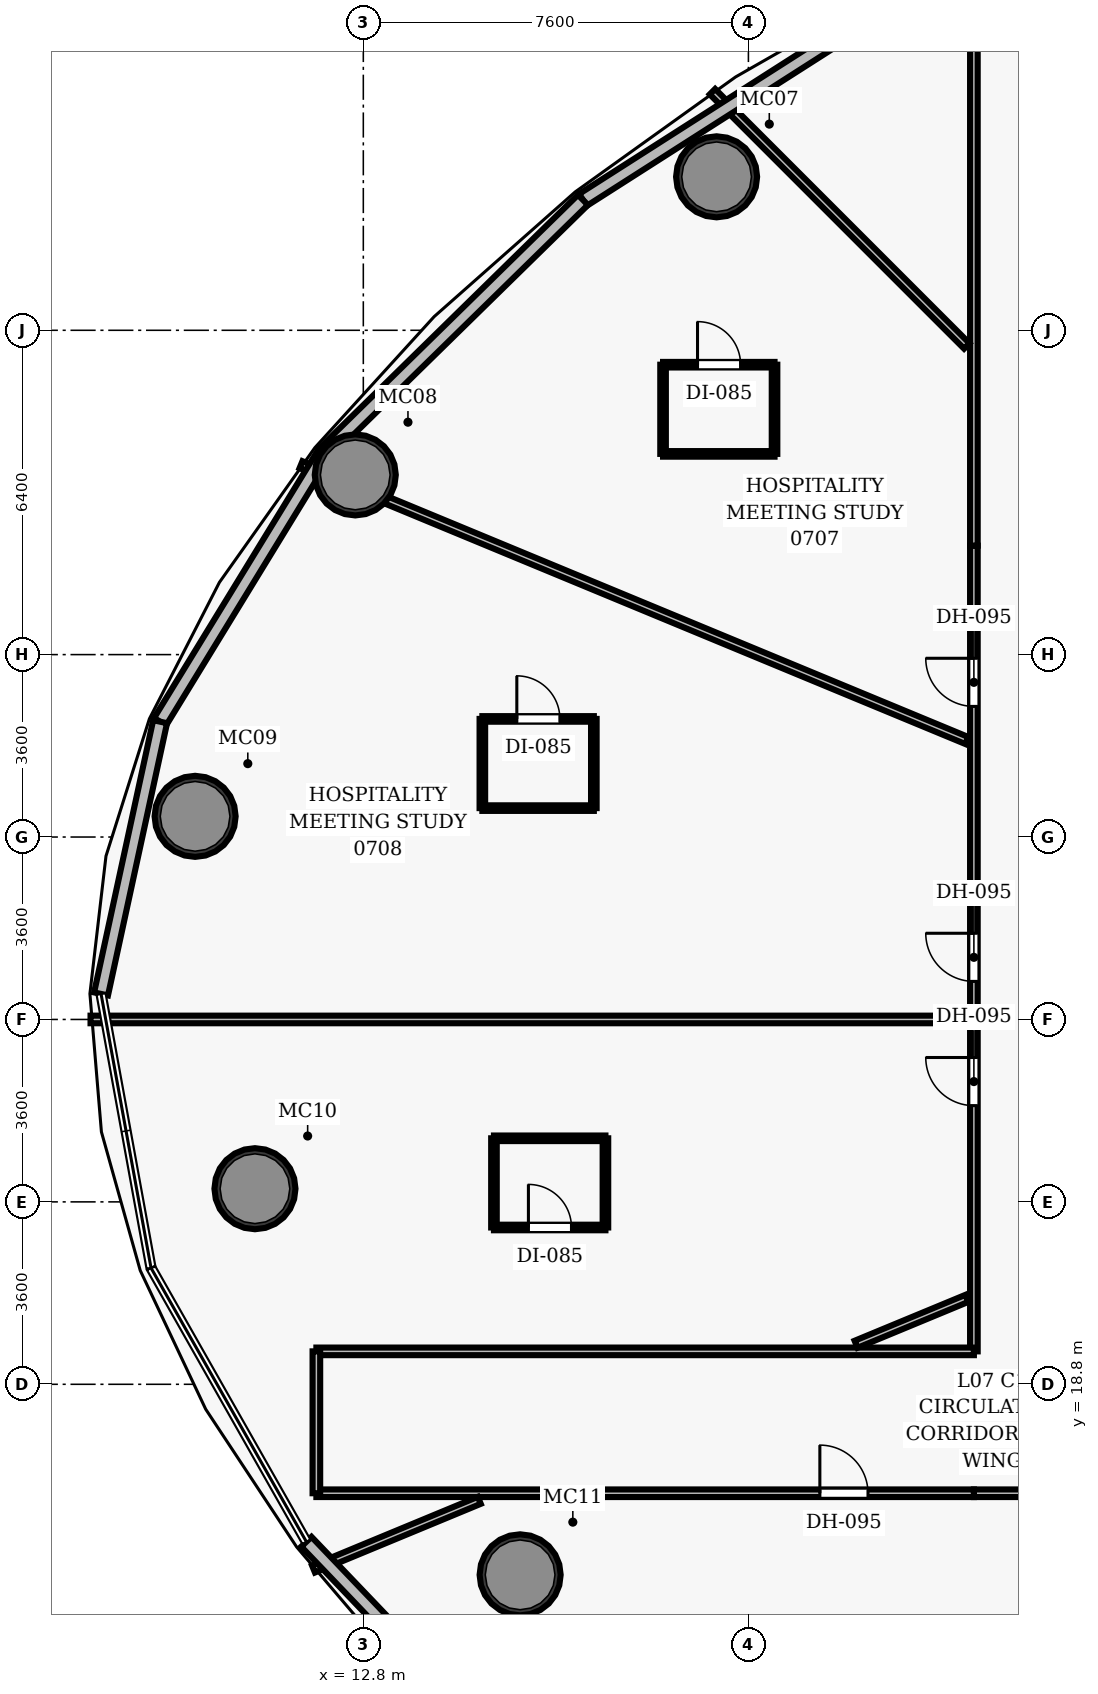
"""IFC4 building model, lengths in metres.
Left out: names, types, materials, properties, quantities, classifications, styles, units other than length and angle.
Written with IfcOpenShell. Run it as: python <this file> out.ifc"""

import sys

from ifc_helpers import new_model, si_unit, direction, frame, frame_2d, origin, origin_2d, place, context, subcontext, project, spatial, rectangle, hollow_circle, extrude, element, fill, save


model = new_model("IFC4")
c1 = context("Model", 3, precision=1e-05, world=origin(), true_north=direction((0.0, 1.0)))
c2 = subcontext(c1, "Body", "Model", "MODEL_VIEW")
j1 = project(units=[si_unit("LENGTHUNIT", "METRE"), si_unit("PLANEANGLEUNIT", "RADIAN")], contexts=[c1])
p1 = place(None, origin())
s1 = spatial("IfcSite", under=j1, at=p1, CompositionType="ELEMENT")
p2 = place(p1, origin())
s2 = spatial("IfcBuilding", under=s1, at=p2, CompositionType="ELEMENT")
p3 = place(p2, frame((0.0, 0.0, 41.4)))
s3 = spatial("IfcBuildingStorey", under=s2, at=p3, CompositionType="ELEMENT", Elevation=41.4)
for number, where, z_axis, x_axis in (
    (1, (19.772, 42.629, 0.0), (0.0, 0.0, 1.0), (1.0, 0.0, 0.0)),
    (2, (12.641, 36.746, 0.0), (0.0, 0.0, 1.0), (1.0, 0.0, 0.0)),
    (3, (9.48, 30.008, 0.0), (0.0, 0.0, 1.0), (1.0, 0.0, 0.0)),
    (4, (10.661, 22.66, 0.0), (0.0, 0.0, 1.0), (1.0, 0.0, 0.0)),
    (5, (15.895, 15.04, 0.0), (0.0, 0.0, 1.0), (1.0, 0.0, 0.0)),
):
    element("IfcColumn", number, at=place(p3, frame(where, z_axis=z_axis, x_axis=x_axis)), inside=s3, PredefinedType="COLUMN", context=c2, shape_type="SweptSolid", body=[
        extrude(hollow_circle(Radius=0.8, WallThickness=0.06, at=origin_2d()), origin(), (0.0, 0.0, 1.0), 3.5),
    ])
p4 = place(p3, frame((24.85, 16.65, 0.0), z_axis=(0.0, 0.0, 1.0), x_axis=(1.0, 0.0, 0.0)))
e6 = element("IfcWall", 6, at=p4, inside=s3, PredefinedType="PARTITIONING", context=c2, shape_type="SweptSolid", body=[
    extrude(rectangle(XDim=23.5, YDim=0.15, at=frame_2d((11.75, 0.0))), origin(), (0.0, 0.0, 1.0), 2.6),
])
p5 = place(p4, frame((7.505, 0.0, 0.0)))
e7 = element("IfcOpeningElement", 7, at=p5, cuts=e6, PredefinedType="OPENING", context=c2, shape_type="SweptSolid", body=[
    extrude(rectangle(XDim=0.95, YDim=2.15, at=frame_2d((0.475, 1.075))), frame((0.0, 0.085, 0.0), z_axis=(0.0, -1.0, 0.0), x_axis=(1.0, 0.0, 0.0)), (0.0, 0.0, 1.0), 0.17),
])
p6 = place(p4, frame((11.391, 0.0, 0.0)))
e8 = element("IfcOpeningElement", 8, at=p6, cuts=e6, PredefinedType="OPENING", context=c2, shape_type="SweptSolid", body=[
    extrude(rectangle(XDim=0.95, YDim=2.15, at=frame_2d((0.475, 1.075))), frame((0.0, 0.085, 0.0), z_axis=(0.0, -1.0, 0.0), x_axis=(1.0, 0.0, 0.0)), (0.0, 0.0, 1.0), 0.17),
])
p7 = place(p4, frame((14.636, 0.0, 0.0)))
e9 = element("IfcOpeningElement", 9, at=p7, cuts=e6, PredefinedType="OPENING", context=c2, shape_type="SweptSolid", body=[
    extrude(rectangle(XDim=0.95, YDim=2.15, at=frame_2d((0.475, 1.075))), frame((0.0, 0.085, 0.0), z_axis=(0.0, -1.0, 0.0), x_axis=(1.0, 0.0, 0.0)), (0.0, 0.0, 1.0), 0.17),
])
p8 = place(p4, frame((17.845, 0.0, 0.0)))
e10 = element("IfcOpeningElement", 10, at=p8, cuts=e6, PredefinedType="OPENING", context=c2, shape_type="SweptSolid", body=[
    extrude(rectangle(XDim=0.95, YDim=2.15, at=frame_2d((0.475, 1.075))), frame((0.0, 0.085, 0.0), z_axis=(0.0, -1.0, 0.0), x_axis=(1.0, 0.0, 0.0)), (0.0, 0.0, 1.0), 0.17),
])
p9 = place(p3, frame((24.85, 19.45, 0.0), z_axis=(0.0, 0.0, 1.0), x_axis=(0.0, 1.0, 0.0)))
e11 = element("IfcWall", 11, at=p9, inside=s3, PredefinedType="PARTITIONING", context=c2, shape_type="SweptSolid", body=[
    extrude(rectangle(XDim=15.9, YDim=0.15, at=frame_2d((7.95, 0.0))), origin(), (0.0, 0.0, 1.0), 2.6),
])
p10 = place(p9, frame((12.728, 0.0, 0.0)))
e12 = element("IfcOpeningElement", 12, at=p10, cuts=e11, PredefinedType="OPENING", context=c2, shape_type="SweptSolid", body=[
    extrude(rectangle(XDim=0.95, YDim=2.15, at=frame_2d((0.475, 1.075))), frame((0.0, 0.085, 0.0), z_axis=(0.0, -1.0, 0.0), x_axis=(1.0, 0.0, 0.0)), (0.0, 0.0, 1.0), 0.17),
])
p11 = place(p9, frame((7.301, 0.0, 0.0)))
e13 = element("IfcOpeningElement", 13, at=p11, cuts=e11, PredefinedType="OPENING", context=c2, shape_type="SweptSolid", body=[
    extrude(rectangle(XDim=0.95, YDim=2.15, at=frame_2d((0.475, 1.075))), frame((0.0, 0.085, 0.0), z_axis=(0.0, -1.0, 0.0), x_axis=(1.0, 0.0, 0.0)), (0.0, 0.0, 1.0), 0.17),
])
p12 = place(p9, frame((4.849, 0.0, 0.0)))
e14 = element("IfcOpeningElement", 14, at=p12, cuts=e11, PredefinedType="OPENING", context=c2, shape_type="SweptSolid", body=[
    extrude(rectangle(XDim=0.95, YDim=2.15, at=frame_2d((0.475, 1.075))), frame((0.0, 0.085, 0.0), z_axis=(0.0, -1.0, 0.0), x_axis=(1.0, 0.0, 0.0)), (0.0, 0.0, 1.0), 0.17),
])
p13 = place(p3, frame((11.874, 19.45, 0.0), z_axis=(0.0, 0.0, 1.0), x_axis=(1.0, 0.0, 0.0)))
e15 = element("IfcWall", 15, at=p13, inside=s3, PredefinedType="PARTITIONING", context=c2, shape_type="SweptSolid", body=[
    extrude(rectangle(XDim=12.977, YDim=0.15, at=frame_2d((6.488, 0.0))), origin(), (0.0, 0.0, 1.0), 2.6),
])
p14 = place(p3, frame((11.874, 16.65, 0.0), z_axis=(0.0, 0.0, 1.0), x_axis=(1.0, 0.0, 0.0)))
e16 = element("IfcWall", 16, at=p14, inside=s3, PredefinedType="PARTITIONING", context=c2, shape_type="SweptSolid", body=[
    extrude(rectangle(XDim=12.977, YDim=0.15, at=frame_2d((6.488, 0.0))), origin(), (0.0, 0.0, 1.0), 2.6),
])
p15 = place(p14, frame((9.937, 0.0, 0.0)))
e17 = element("IfcOpeningElement", 17, at=p15, cuts=e16, PredefinedType="OPENING", context=c2, shape_type="SweptSolid", body=[
    extrude(rectangle(XDim=0.95, YDim=2.15, at=frame_2d((0.475, 1.075))), frame((0.0, 0.085, 0.0), z_axis=(0.0, -1.0, 0.0), x_axis=(1.0, 0.0, 0.0)), (0.0, 0.0, 1.0), 0.17),
])
p16 = place(p3, frame((11.874, 16.65, 0.0), z_axis=(0.0, 0.0, 1.0), x_axis=(0.0, 1.0, 0.0)))
e18 = element("IfcWall", 18, at=p16, inside=s3, PredefinedType="PARTITIONING", context=c2, shape_type="SweptSolid", body=[
    extrude(rectangle(XDim=2.8, YDim=0.15, at=frame_2d((1.4, 0.0))), origin(), (0.0, 0.0, 1.0), 2.6),
])
p17 = place(p3, frame((24.85, 35.35, 0.0), z_axis=(0.0, 0.0, 1.0), x_axis=(0.0, 1.0, 0.0)))
e19 = element("IfcWall", 19, at=p17, inside=s3, PredefinedType="PARTITIONING", context=c2, shape_type="SweptSolid", body=[
    extrude(rectangle(XDim=10.15, YDim=0.15, at=frame_2d((5.075, 0.0))), origin(), (0.0, 0.0, 1.0), 2.6),
])
p18 = place(p3, frame((24.71, 39.29, 0.0), z_axis=(0.0, 0.0, 1.0), x_axis=(-0.707106781187, 0.707106781187, 0.0)))
e20 = element("IfcWall", 20, at=p18, inside=s3, PredefinedType="PARTITIONING", context=c2, shape_type="SweptSolid", body=[
    extrude(rectangle(XDim=7.099, YDim=0.15, at=frame_2d((3.549, 0.0))), origin(), (0.0, 0.0, 1.0), 2.6),
])
p19 = place(p3, frame((24.71, 31.505, 0.0), z_axis=(0.0, 0.0, 1.0), x_axis=(-0.923878333013, 0.382686328197, 0.0)))
e21 = element("IfcWall", 21, at=p19, inside=s3, PredefinedType="PARTITIONING", context=c2, shape_type="SweptSolid", body=[
    extrude(rectangle(XDim=14.223, YDim=0.15, at=frame_2d((7.111, 0.0))), origin(), (0.0, 0.0, 1.0), 2.6),
])
p20 = place(p3, frame((24.71, 26.0, 0.0), z_axis=(0.0, 0.0, 1.0), x_axis=(-1.0, 0.0, 0.0)))
e22 = element("IfcWall", 22, at=p20, inside=s3, PredefinedType="PARTITIONING", context=c2, shape_type="SweptSolid", body=[
    extrude(rectangle(XDim=17.293, YDim=0.15, at=frame_2d((8.647, 0.0))), origin(), (0.0, 0.0, 1.0), 2.6),
])
p21 = place(p3, frame((24.71, 20.495, 0.0), z_axis=(0.0, 0.0, 1.0), x_axis=(-0.923887247067, -0.382664807249, 0.0)))
e23 = element("IfcWall", 23, at=p21, inside=s3, PredefinedType="PARTITIONING", context=c2, shape_type="SweptSolid", body=[
    extrude(rectangle(XDim=2.365, YDim=0.15, at=frame_2d((1.183, 0.0))), origin(), (0.0, 0.0, 1.0), 2.6),
])
p22 = place(p3, frame((15.089, 16.51, 0.0), z_axis=(0.0, 0.0, 1.0), x_axis=(-0.923882422403, -0.382676455475, 0.0)))
e24 = element("IfcWall", 24, at=p22, inside=s3, PredefinedType="PARTITIONING", context=c2, shape_type="SweptSolid", body=[
    extrude(rectangle(XDim=3.542, YDim=0.15, at=frame_2d((1.771, 0.0))), origin(), (0.0, 0.0, 1.0), 2.6),
])
p23 = place(p3, frame((28.51, 16.51, 0.0), z_axis=(0.0, 0.0, 1.0), x_axis=(-0.707106781187, -0.707106781187, 0.0)))
e25 = element("IfcWall", 25, at=p23, inside=s3, PredefinedType="PARTITIONING", context=c2, shape_type="SweptSolid", body=[
    extrude(rectangle(XDim=12.312, YDim=0.15, at=frame_2d((6.156, 0.0))), origin(), (0.0, 0.0, 1.0), 2.6),
])
p24 = place(p3, frame((18.716, 37.161, 0.0), z_axis=(0.0, 0.0, 1.0), x_axis=(1.0, 0.0, 0.0)))
e26 = element("IfcWall", 26, at=p24, inside=s3, PredefinedType="PARTITIONING", context=c2, shape_type="SweptSolid", body=[
    extrude(rectangle(XDim=2.2, YDim=0.11, at=frame_2d((1.1, 0.0))), origin(), (0.0, 0.0, 1.0), 2.6),
])
p25 = place(p3, frame((18.716, 38.921, 0.0), z_axis=(0.0, 0.0, 1.0), x_axis=(1.0, 0.0, 0.0)))
e27 = element("IfcWall", 27, at=p25, inside=s3, PredefinedType="PARTITIONING", context=c2, shape_type="SweptSolid", body=[
    extrude(rectangle(XDim=2.2, YDim=0.11, at=frame_2d((1.1, 0.0))), origin(), (0.0, 0.0, 1.0), 2.6),
])
p26 = place(p25, frame((0.68, 0.0, 0.0)))
e28 = element("IfcOpeningElement", 28, at=p26, cuts=e27, PredefinedType="OPENING", context=c2, shape_type="SweptSolid", body=[
    extrude(rectangle(XDim=0.85, YDim=2.1, at=frame_2d((0.425, 1.05))), frame((0.0, 0.065, 0.0), z_axis=(0.0, -1.0, 0.0), x_axis=(1.0, 0.0, 0.0)), (0.0, 0.0, 1.0), 0.13),
])
for number, where, z_axis, x_axis in (
    (29, (18.716, 37.161, 0.0), (0.0, 0.0, 1.0), (0.0, 1.0, 0.0)),
    (30, (20.916, 37.161, 0.0), (0.0, 0.0, 1.0), (0.0, 1.0, 0.0)),
):
    element("IfcWall", number, at=place(p3, frame(where, z_axis=z_axis, x_axis=x_axis)), inside=s3, PredefinedType="PARTITIONING", context=c2, shape_type="SweptSolid", body=[
        extrude(rectangle(XDim=1.76, YDim=0.11, at=frame_2d((0.88, 0.0))), origin(), (0.0, 0.0, 1.0), 2.6),
    ])
p27 = place(p3, frame((15.149, 30.171, 0.0), z_axis=(0.0, 0.0, 1.0), x_axis=(1.0, 0.0, 0.0)))
e31 = element("IfcWall", 31, at=p27, inside=s3, PredefinedType="PARTITIONING", context=c2, shape_type="SweptSolid", body=[
    extrude(rectangle(XDim=2.2, YDim=0.11, at=frame_2d((1.1, 0.0))), origin(), (0.0, 0.0, 1.0), 2.6),
])
p28 = place(p3, frame((15.149, 31.931, 0.0), z_axis=(0.0, 0.0, 1.0), x_axis=(1.0, 0.0, 0.0)))
e32 = element("IfcWall", 32, at=p28, inside=s3, PredefinedType="PARTITIONING", context=c2, shape_type="SweptSolid", body=[
    extrude(rectangle(XDim=2.2, YDim=0.11, at=frame_2d((1.1, 0.0))), origin(), (0.0, 0.0, 1.0), 2.6),
])
p29 = place(p28, frame((0.68, 0.0, 0.0)))
e33 = element("IfcOpeningElement", 33, at=p29, cuts=e32, PredefinedType="OPENING", context=c2, shape_type="SweptSolid", body=[
    extrude(rectangle(XDim=0.85, YDim=2.1, at=frame_2d((0.425, 1.05))), frame((0.0, 0.065, 0.0), z_axis=(0.0, -1.0, 0.0), x_axis=(1.0, 0.0, 0.0)), (0.0, 0.0, 1.0), 0.13),
])
for number, where, z_axis, x_axis in (
    (34, (15.149, 30.171, 0.0), (0.0, 0.0, 1.0), (0.0, 1.0, 0.0)),
    (35, (17.35, 30.171, 0.0), (0.0, 0.0, 1.0), (0.0, 1.0, 0.0)),
):
    element("IfcWall", number, at=place(p3, frame(where, z_axis=z_axis, x_axis=x_axis)), inside=s3, PredefinedType="PARTITIONING", context=c2, shape_type="SweptSolid", body=[
        extrude(rectangle(XDim=1.76, YDim=0.11, at=frame_2d((0.88, 0.0))), origin(), (0.0, 0.0, 1.0), 2.6),
    ])
p30 = place(p3, frame((15.378, 21.895, 0.0), z_axis=(0.0, 0.0, 1.0), x_axis=(1.0, 0.0, 0.0)))
e36 = element("IfcWall", 36, at=p30, inside=s3, PredefinedType="PARTITIONING", context=c2, shape_type="SweptSolid", body=[
    extrude(rectangle(XDim=2.2, YDim=0.11, at=frame_2d((1.1, 0.0))), origin(), (0.0, 0.0, 1.0), 2.6),
])
p31 = place(p30, frame((0.68, 0.0, 0.0)))
e37 = element("IfcOpeningElement", 37, at=p31, cuts=e36, PredefinedType="OPENING", context=c2, shape_type="SweptSolid", body=[
    extrude(rectangle(XDim=0.85, YDim=2.1, at=frame_2d((0.425, 1.05))), frame((0.0, 0.065, 0.0), z_axis=(0.0, -1.0, 0.0), x_axis=(1.0, 0.0, 0.0)), (0.0, 0.0, 1.0), 0.13),
])
p32 = place(p3, frame((15.378, 23.655, 0.0), z_axis=(0.0, 0.0, 1.0), x_axis=(1.0, 0.0, 0.0)))
e38 = element("IfcWall", 38, at=p32, inside=s3, PredefinedType="PARTITIONING", context=c2, shape_type="SweptSolid", body=[
    extrude(rectangle(XDim=2.2, YDim=0.11, at=frame_2d((1.1, 0.0))), origin(), (0.0, 0.0, 1.0), 2.6),
])
for number, where, z_axis, x_axis in (
    (39, (15.378, 21.895, 0.0), (0.0, 0.0, 1.0), (0.0, 1.0, 0.0)),
    (40, (17.578, 21.895, 0.0), (0.0, 0.0, 1.0), (0.0, 1.0, 0.0)),
):
    element("IfcWall", number, at=place(p3, frame(where, z_axis=z_axis, x_axis=x_axis)), inside=s3, PredefinedType="PARTITIONING", context=c2, shape_type="SweptSolid", body=[
        extrude(rectangle(XDim=1.76, YDim=0.11, at=frame_2d((0.88, 0.0))), origin(), (0.0, 0.0, 1.0), 2.6),
    ])
p33 = place(p3, frame((17.135, 42.173, 0.0), z_axis=(0.0, 0.0, 1.0), x_axis=(0.84275430181, 0.538298417962, 0.0)))
e41 = element("IfcWall", 41, at=p33, inside=s3, PredefinedType="SOLIDWALL", context=c2, shape_type="SweptSolid", body=[
    extrude(rectangle(XDim=7.845, YDim=0.28, at=frame_2d((3.922, 0.0))), origin(), (0.0, 0.0, 1.0), 3.25),
])
p34 = place(p3, frame((12.033, 37.175, 0.0), z_axis=(0.0, 0.0, 1.0), x_axis=(0.714316037153, 0.699823262736, 0.0)))
e42 = element("IfcWall", 42, at=p34, inside=s3, PredefinedType="SOLIDWALL", context=c2, shape_type="SweptSolid", body=[
    extrude(rectangle(XDim=7.143, YDim=0.28, at=frame_2d((3.571, 0.0))), origin(), (0.0, 0.0, 1.0), 3.25),
])
p35 = place(p3, frame((8.79, 31.876, 0.0), z_axis=(0.0, 0.0, 1.0), x_axis=(0.522069850624, 0.852902732479, 0.0)))
e43 = element("IfcWall", 43, at=p35, inside=s3, PredefinedType="SOLIDWALL", context=c2, shape_type="SweptSolid", body=[
    extrude(rectangle(XDim=6.212, YDim=0.28, at=frame_2d((3.106, 0.0))), origin(), (0.0, 0.0, 1.0), 3.25),
])
p36 = place(p3, frame((7.624, 26.504, 0.0), z_axis=(0.0, 0.0, 1.0), x_axis=(0.211966847204, 0.977276857235, 0.0)))
e44 = element("IfcWall", 44, at=p36, inside=s3, PredefinedType="SOLIDWALL", context=c2, shape_type="SweptSolid", body=[
    extrude(rectangle(XDim=5.498, YDim=0.28, at=frame_2d((2.749, 0.0))), origin(), (0.0, 0.0, 1.0), 3.25),
])
p37 = place(p3, frame((16.61, 10.528, 0.0), z_axis=(0.0, 0.0, 1.0), x_axis=(-0.690719589941, 0.723122706096, 0.0)))
e45 = element("IfcWall", 45, at=p37, inside=s3, PredefinedType="SOLIDWALL", context=c2, shape_type="SweptSolid", body=[
    extrude(rectangle(XDim=7.143, YDim=0.28, at=frame_2d((3.571, 0.0))), origin(), (0.0, 0.0, 1.0), 3.25),
])
p38 = place(p10, origin())
e46 = element("IfcDoor", 46, at=p38, inside=s3, OperationType="SINGLE_SWING_RIGHT", PredefinedType="DOOR", context=c2, shape_type="SweptSolid", body=[
    extrude(rectangle(XDim=0.95, YDim=2.15, at=frame_2d((0.475, 1.075))), frame((0.0, 0.025, 0.0), z_axis=(0.0, -1.0, 0.0), x_axis=(1.0, 0.0, 0.0)), (0.0, 0.0, 1.0), 0.05),
])
fill(e12, e46)
p39 = place(p26, origin())
e47 = element("IfcDoor", 47, at=p39, inside=s3, OperationType="SINGLE_SWING_LEFT", PredefinedType="DOOR", context=c2, shape_type="SweptSolid", body=[
    extrude(rectangle(XDim=0.85, YDim=2.1, at=frame_2d((0.425, 1.05))), frame((0.0, 0.025, 0.0), z_axis=(0.0, -1.0, 0.0), x_axis=(1.0, 0.0, 0.0)), (0.0, 0.0, 1.0), 0.05),
])
fill(e28, e47)
p40 = place(p11, origin())
e48 = element("IfcDoor", 48, at=p40, inside=s3, OperationType="SINGLE_SWING_RIGHT", PredefinedType="DOOR", context=c2, shape_type="SweptSolid", body=[
    extrude(rectangle(XDim=0.95, YDim=2.15, at=frame_2d((0.475, 1.075))), frame((0.0, 0.025, 0.0), z_axis=(0.0, -1.0, 0.0), x_axis=(1.0, 0.0, 0.0)), (0.0, 0.0, 1.0), 0.05),
])
fill(e13, e48)
p41 = place(p29, origin())
e49 = element("IfcDoor", 49, at=p41, inside=s3, OperationType="SINGLE_SWING_LEFT", PredefinedType="DOOR", context=c2, shape_type="SweptSolid", body=[
    extrude(rectangle(XDim=0.85, YDim=2.1, at=frame_2d((0.425, 1.05))), frame((0.0, 0.025, 0.0), z_axis=(0.0, -1.0, 0.0), x_axis=(1.0, 0.0, 0.0)), (0.0, 0.0, 1.0), 0.05),
])
fill(e33, e49)
p42 = place(p12, origin())
e50 = element("IfcDoor", 50, at=p42, inside=s3, OperationType="SINGLE_SWING_RIGHT", PredefinedType="DOOR", context=c2, shape_type="SweptSolid", body=[
    extrude(rectangle(XDim=0.95, YDim=2.15, at=frame_2d((0.475, 1.075))), frame((0.0, 0.025, 0.0), z_axis=(0.0, -1.0, 0.0), x_axis=(1.0, 0.0, 0.0)), (0.0, 0.0, 1.0), 0.05),
])
fill(e14, e50)
p43 = place(p31, origin())
e51 = element("IfcDoor", 51, at=p43, inside=s3, OperationType="SINGLE_SWING_LEFT", PredefinedType="DOOR", context=c2, shape_type="SweptSolid", body=[
    extrude(rectangle(XDim=0.85, YDim=2.1, at=frame_2d((0.425, 1.05))), frame((0.0, 0.025, 0.0), z_axis=(0.0, -1.0, 0.0), x_axis=(1.0, 0.0, 0.0)), (0.0, 0.0, 1.0), 0.05),
])
fill(e37, e51)
p44 = place(p15, origin())
e52 = element("IfcDoor", 52, at=p44, inside=s3, OperationType="SINGLE_SWING_LEFT", PredefinedType="DOOR", context=c2, shape_type="SweptSolid", body=[
    extrude(rectangle(XDim=0.95, YDim=2.15, at=frame_2d((0.475, 1.075))), frame((0.0, 0.025, 0.0), z_axis=(0.0, -1.0, 0.0), x_axis=(1.0, 0.0, 0.0)), (0.0, 0.0, 1.0), 0.05),
])
fill(e17, e52)
save(model, sys.argv[1])
